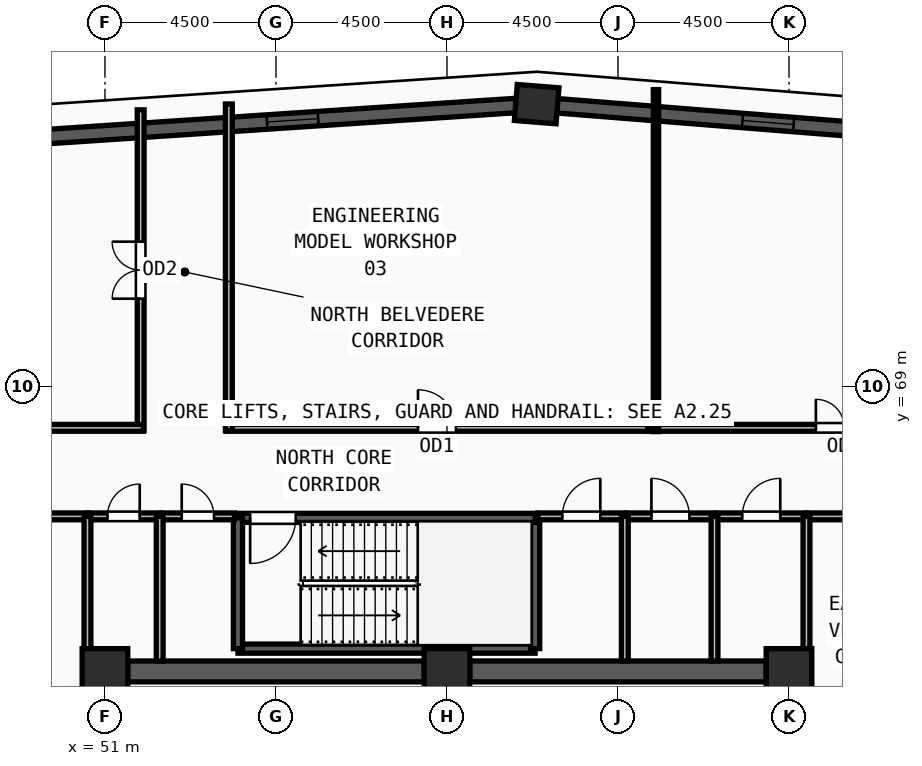
"""IFC4 building model, lengths in metres.
Left out: names, types, materials, properties, quantities, classifications, styles, units other than length and angle.
Written with IfcOpenShell. Run it as: python <this file> out.ifc"""

import sys

from ifc_helpers import new_model, si_unit, direction, frame, frame_2d, origin, origin_2d, place, context, subcontext, project, spatial, rectangle, extrude, source, transform, mapped, element, fill, save


model = new_model("IFC4")
c1 = context("Model", 3, precision=1e-05, world=origin(), true_north=direction((0.0, 1.0)))
c2 = subcontext(c1, "Body", "Model", "MODEL_VIEW")
j1 = project(units=[si_unit("LENGTHUNIT", "METRE"), si_unit("PLANEANGLEUNIT", "RADIAN")], contexts=[c1])
p1 = place(None, origin())
s1 = spatial("IfcSite", under=j1, at=p1, CompositionType="ELEMENT")
p2 = place(p1, origin())
s2 = spatial("IfcBuilding", under=s1, at=p2, CompositionType="ELEMENT")
p3 = place(p2, frame((0.0, 0.0, 286.5)))
s3 = spatial("IfcBuildingStorey", under=s2, at=p3, CompositionType="ELEMENT", Elevation=286.5)
m1 = source(origin(), c2, "Body", "SweptSolid", [
    extrude(rectangle(XDim=1.2, YDim=1.2, at=origin_2d()), origin(), (0.0, 0.0, 1.0), 3.75),
])
for number, where, z_axis, x_axis in (
    (1, (69.0, 61.5, 0.0), (0.0, 0.0, 1.0), (1.0, 0.0, 0.0)),
    (2, (60.0, 61.5, 0.0), (0.0, 0.0, 1.0), (1.0, 0.0, 0.0)),
    (3, (51.0, 61.5, 0.0), (0.0, 0.0, 1.0), (1.0, 0.0, 0.0)),
):
    element("IfcColumn", number, at=place(p3, frame(where, z_axis=z_axis, x_axis=x_axis)), inside=s3, PredefinedType="COLUMN", context=c2, shape_type="MappedRepresentation", body=[
        mapped(m1, transform((0.0, 0.0, 0.0), x_axis=(1.0, 0.0, 0.0), y_axis=(0.0, 1.0, 0.0), z_axis=(0.0, 0.0, 1.0), scale=1.0)),
    ])
m2 = source(origin(), c2, "Body", "SweptSolid", [
    extrude(rectangle(XDim=1.1, YDim=0.95, at=origin_2d()), origin(), (0.0, 0.0, 1.0), 3.75),
])
p4 = place(p3, frame((62.36, 76.427, 0.0), z_axis=(0.0, 0.0, 1.0), x_axis=(-0.996862316013, 0.079155056145, 0.0)))
e4 = element("IfcColumn", 4, at=p4, inside=s3, PredefinedType="COLUMN", context=c2, shape_type="MappedRepresentation", body=[
    mapped(m2, transform((0.0, 0.0, 0.0), x_axis=(1.0, 0.0, 0.0), y_axis=(0.0, 1.0, 0.0), z_axis=(0.0, 0.0, 1.0), scale=1.0)),
])
p5 = place(p3, frame((85.103, 74.621, 0.0), z_axis=(0.0, 0.0, 1.0), x_axis=(-0.996863155658, 0.079144481122, 0.0)))
e5 = element("IfcWall", 5, at=p5, inside=s3, PredefinedType="SOLIDWALL", context=c2, shape_type="SweptSolid", body=[
    extrude(rectangle(XDim=22.275, YDim=0.38, at=frame_2d((11.137, 0.0))), origin(), (0.0, 0.0, 1.0), 3.57),
])
m3 = source(origin(), c2, "Body", "SweptSolid", [
    extrude(rectangle(XDim=1.35, YDim=1.85, at=frame_2d((0.675, 0.925))), frame((0.0, 0.2, 0.0), z_axis=(0.0, -1.0, 0.0), x_axis=(1.0, 0.0, 0.0)), (0.0, 0.0, 1.0), 0.4),
])
p6 = place(p5, frame((4.894, 0.0, 0.55)))
e6 = element("IfcOpeningElement", 6, at=p6, cuts=e5, PredefinedType="OPENING", context=c2, shape_type="MappedRepresentation", body=[
    mapped(m3, transform((0.0, 0.0, 0.0), x_axis=(1.0, 0.0, 0.0), y_axis=(0.0, 1.0, 0.0), z_axis=(0.0, 0.0, 1.0), scale=1.0)),
])
p7 = place(p5, frame((10.462, 0.0, 0.55)))
e7 = element("IfcOpeningElement", 7, at=p7, cuts=e5, PredefinedType="OPENING", context=c2, shape_type="MappedRepresentation", body=[
    mapped(m3, transform((0.0, 0.0, 0.0), x_axis=(1.0, 0.0, 0.0), y_axis=(0.0, 1.0, 0.0), z_axis=(0.0, 0.0, 1.0), scale=1.0)),
])
p8 = place(p5, frame((16.031, 0.0, 0.55)))
e8 = element("IfcOpeningElement", 8, at=p8, cuts=e5, PredefinedType="OPENING", context=c2, shape_type="MappedRepresentation", body=[
    mapped(m3, transform((0.0, 0.0, 0.0), x_axis=(1.0, 0.0, 0.0), y_axis=(0.0, 1.0, 0.0), z_axis=(0.0, 0.0, 1.0), scale=1.0)),
])
p9 = place(p3, frame((61.821, 76.391, 0.0), z_axis=(0.0, 0.0, 1.0), x_axis=(-0.997809311933, -0.06615570285, 0.0)))
e9 = element("IfcWall", 9, at=p9, inside=s3, PredefinedType="SOLIDWALL", context=c2, shape_type="SweptSolid", body=[
    extrude(rectangle(XDim=26.984, YDim=0.38, at=frame_2d((13.492, 0.0))), origin(), (0.0, 0.0, 1.0), 3.57),
])
p10 = place(p9, frame((5.221, 0.0, 0.55)))
e10 = element("IfcOpeningElement", 10, at=p10, cuts=e9, PredefinedType="OPENING", context=c2, shape_type="MappedRepresentation", body=[
    mapped(m3, transform((0.0, 0.0, 0.0), x_axis=(1.0, 0.0, 0.0), y_axis=(0.0, 1.0, 0.0), z_axis=(0.0, 0.0, 1.0), scale=1.0)),
])
p11 = place(p9, frame((12.817, 0.0, 0.55)))
e11 = element("IfcOpeningElement", 11, at=p11, cuts=e9, PredefinedType="OPENING", context=c2, shape_type="MappedRepresentation", body=[
    mapped(m3, transform((0.0, 0.0, 0.0), x_axis=(1.0, 0.0, 0.0), y_axis=(0.0, 1.0, 0.0), z_axis=(0.0, 0.0, 1.0), scale=1.0)),
])
p12 = place(p9, frame((19.563, 0.0, 0.55)))
e12 = element("IfcOpeningElement", 12, at=p12, cuts=e9, PredefinedType="OPENING", context=c2, shape_type="MappedRepresentation", body=[
    mapped(m3, transform((0.0, 0.0, 0.0), x_axis=(1.0, 0.0, 0.0), y_axis=(0.0, 1.0, 0.0), z_axis=(0.0, 0.0, 1.0), scale=1.0)),
])
for number, where, z_axis, x_axis in (
    (13, (51.6, 61.5, 0.0), (0.0, 0.0, 1.0), (1.0, 0.0, 0.0)),
    (14, (60.6, 61.5, 0.0), (0.0, 0.0, 1.0), (1.0, 0.0, 0.0)),
):
    element("IfcWall", number, at=place(p3, frame(where, z_axis=z_axis, x_axis=x_axis)), inside=s3, PredefinedType="SHEAR", context=c2, shape_type="SweptSolid", body=[
        extrude(rectangle(XDim=7.8, YDim=0.55, at=frame_2d((3.9, 0.0))), origin(), (0.0, 0.0, 1.0), 3.57),
    ])
p13 = place(p3, frame((54.5, 62.1, 0.0), z_axis=(0.0, 0.0, 1.0), x_axis=(1.0, 0.0, 0.0)))
e15 = element("IfcWall", 15, at=p13, inside=s3, PredefinedType="SOLIDWALL", context=c2, shape_type="SweptSolid", body=[
    extrude(rectangle(XDim=7.82, YDim=0.24, at=frame_2d((3.91, 0.0))), origin(), (0.0, 0.0, 1.0), 3.57),
])
p14 = place(p3, frame((62.32, 62.1, 0.0), z_axis=(0.0, 0.0, 1.0), x_axis=(0.0, 1.0, 0.0)))
e16 = element("IfcWall", 16, at=p14, inside=s3, PredefinedType="SOLIDWALL", context=c2, shape_type="SweptSolid", body=[
    extrude(rectangle(XDim=3.44, YDim=0.24, at=frame_2d((1.72, 0.0))), origin(), (0.0, 0.0, 1.0), 3.57),
])
p15 = place(p3, frame((62.32, 65.54, 0.0), z_axis=(0.0, 0.0, 1.0), x_axis=(-1.0, 0.0, 0.0)))
e17 = element("IfcWall", 17, at=p15, inside=s3, PredefinedType="SOLIDWALL", context=c2, shape_type="SweptSolid", body=[
    extrude(rectangle(XDim=7.82, YDim=0.24, at=frame_2d((3.91, 0.0))), origin(), (0.0, 0.0, 1.0), 3.57),
])
m4 = source(origin(), c2, "Body", "SweptSolid", [
    extrude(rectangle(XDim=1.2, YDim=2.2, at=frame_2d((0.6, 1.1))), frame((0.0, 0.13, 0.0), z_axis=(0.0, -1.0, 0.0), x_axis=(1.0, 0.0, 0.0)), (0.0, 0.0, 1.0), 0.26),
])
p16 = place(p15, frame((6.3, 0.0, 0.0)))
e18 = element("IfcOpeningElement", 18, at=p16, cuts=e17, PredefinedType="OPENING", context=c2, shape_type="MappedRepresentation", body=[
    mapped(m4, transform((0.0, 0.0, 0.0), x_axis=(1.0, 0.0, 0.0), y_axis=(0.0, 1.0, 0.0), z_axis=(0.0, 0.0, 1.0), scale=1.0)),
])
p17 = place(p3, frame((54.5, 65.54, 0.0), z_axis=(0.0, 0.0, 1.0), x_axis=(0.0, -1.0, 0.0)))
e19 = element("IfcWall", 19, at=p17, inside=s3, PredefinedType="SOLIDWALL", context=c2, shape_type="SweptSolid", body=[
    extrude(rectangle(XDim=3.44, YDim=0.24, at=frame_2d((1.72, 0.0))), origin(), (0.0, 0.0, 1.0), 3.57),
])
p18 = place(p3, frame((50.54, 65.58, 0.0), z_axis=(0.0, 0.0, 1.0), x_axis=(1.0, 0.0, 0.0)))
e20 = element("IfcWall", 20, at=p18, inside=s3, PredefinedType="PARTITIONING", context=c2, shape_type="SweptSolid", body=[
    extrude(rectangle(XDim=1.9, YDim=0.18, at=frame_2d((0.95, 0.0))), origin(), (0.0, 0.0, 1.0), 3.57),
])
m5 = source(origin(), c2, "Body", "SweptSolid", [
    extrude(rectangle(XDim=0.85, YDim=2.1, at=frame_2d((0.425, 1.05))), frame((0.0, 0.1, 0.0), z_axis=(0.0, -1.0, 0.0), x_axis=(1.0, 0.0, 0.0)), (0.0, 0.0, 1.0), 0.2),
])
p19 = place(p18, frame((0.525, 0.0, 0.0)))
e21 = element("IfcOpeningElement", 21, at=p19, cuts=e20, PredefinedType="OPENING", context=c2, shape_type="MappedRepresentation", body=[
    mapped(m5, transform((0.0, 0.0, 0.0), x_axis=(1.0, 0.0, 0.0), y_axis=(0.0, 1.0, 0.0), z_axis=(0.0, 0.0, 1.0), scale=1.0)),
])
p20 = place(p3, frame((52.48, 65.58, 0.0), z_axis=(0.0, 0.0, 1.0), x_axis=(1.0, 0.0, 0.0)))
e22 = element("IfcWall", 22, at=p20, inside=s3, PredefinedType="PARTITIONING", context=c2, shape_type="SweptSolid", body=[
    extrude(rectangle(XDim=1.93, YDim=0.18, at=frame_2d((0.965, 0.0))), origin(), (0.0, 0.0, 1.0), 3.57),
])
p21 = place(p20, frame((0.54, 0.0, 0.0)))
e23 = element("IfcOpeningElement", 23, at=p21, cuts=e22, PredefinedType="OPENING", context=c2, shape_type="MappedRepresentation", body=[
    mapped(m5, transform((0.0, 0.0, 0.0), x_axis=(1.0, 0.0, 0.0), y_axis=(0.0, 1.0, 0.0), z_axis=(0.0, 0.0, 1.0), scale=1.0)),
])
p22 = place(p3, frame((62.39, 65.58, 0.0), z_axis=(0.0, 0.0, 1.0), x_axis=(1.0, 0.0, 0.0)))
e24 = element("IfcWall", 24, at=p22, inside=s3, PredefinedType="PARTITIONING", context=c2, shape_type="SweptSolid", body=[
    extrude(rectangle(XDim=2.29, YDim=0.18, at=frame_2d((1.145, 0.0))), origin(), (0.0, 0.0, 1.0), 3.57),
])
m6 = source(origin(), c2, "Body", "SweptSolid", [
    extrude(rectangle(XDim=1.0, YDim=2.2, at=frame_2d((0.5, 1.1))), frame((0.0, 0.1, 0.0), z_axis=(0.0, -1.0, 0.0), x_axis=(1.0, 0.0, 0.0)), (0.0, 0.0, 1.0), 0.2),
])
p23 = place(p22, frame((0.645, 0.0, 0.0)))
e25 = element("IfcOpeningElement", 25, at=p23, cuts=e24, PredefinedType="OPENING", context=c2, shape_type="MappedRepresentation", body=[
    mapped(m6, transform((0.0, 0.0, 0.0), x_axis=(1.0, 0.0, 0.0), y_axis=(0.0, 1.0, 0.0), z_axis=(0.0, 0.0, 1.0), scale=1.0)),
])
p24 = place(p3, frame((64.72, 65.58, 0.0), z_axis=(0.0, 0.0, 1.0), x_axis=(1.0, 0.0, 0.0)))
e26 = element("IfcWall", 26, at=p24, inside=s3, PredefinedType="PARTITIONING", context=c2, shape_type="SweptSolid", body=[
    extrude(rectangle(XDim=2.32, YDim=0.18, at=frame_2d((1.16, 0.0))), origin(), (0.0, 0.0, 1.0), 3.57),
])
p25 = place(p24, frame((0.66, 0.0, 0.0)))
e27 = element("IfcOpeningElement", 27, at=p25, cuts=e26, PredefinedType="OPENING", context=c2, shape_type="MappedRepresentation", body=[
    mapped(m6, transform((0.0, 0.0, 0.0), x_axis=(1.0, 0.0, 0.0), y_axis=(0.0, 1.0, 0.0), z_axis=(0.0, 0.0, 1.0), scale=1.0)),
])
p26 = place(p3, frame((67.08, 65.58, 0.0), z_axis=(0.0, 0.0, 1.0), x_axis=(1.0, 0.0, 0.0)))
e28 = element("IfcWall", 28, at=p26, inside=s3, PredefinedType="PARTITIONING", context=c2, shape_type="SweptSolid", body=[
    extrude(rectangle(XDim=2.38, YDim=0.18, at=frame_2d((1.19, 0.0))), origin(), (0.0, 0.0, 1.0), 3.57),
])
p27 = place(p26, frame((0.69, 0.0, 0.0)))
e29 = element("IfcOpeningElement", 29, at=p27, cuts=e28, PredefinedType="OPENING", context=c2, shape_type="MappedRepresentation", body=[
    mapped(m6, transform((0.0, 0.0, 0.0), x_axis=(1.0, 0.0, 0.0), y_axis=(0.0, 1.0, 0.0), z_axis=(0.0, 0.0, 1.0), scale=1.0)),
])
p28 = place(p3, frame((46.7, 65.58, 0.0), z_axis=(0.0, 0.0, 1.0), x_axis=(1.0, 0.0, 0.0)))
e30 = element("IfcWall", 30, at=p28, inside=s3, PredefinedType="PARTITIONING", context=c2, shape_type="SweptSolid", body=[
    extrude(rectangle(XDim=3.84, YDim=0.18, at=frame_2d((1.92, 0.0))), origin(), (0.0, 0.0, 1.0), 3.57),
])
m7 = source(origin(), c2, "Body", "SweptSolid", [
    extrude(rectangle(XDim=1.3, YDim=2.2, at=frame_2d((0.65, 1.1))), frame((0.0, 0.1, 0.0), z_axis=(0.0, -1.0, 0.0), x_axis=(1.0, 0.0, 0.0)), (0.0, 0.0, 1.0), 0.2),
])
p29 = place(p28, frame((1.27, 0.0, 0.0)))
e31 = element("IfcOpeningElement", 31, at=p29, cuts=e30, PredefinedType="OPENING", context=c2, shape_type="MappedRepresentation", body=[
    mapped(m7, transform((0.0, 0.0, 0.0), x_axis=(1.0, 0.0, 0.0), y_axis=(0.0, 1.0, 0.0), z_axis=(0.0, 0.0, 1.0), scale=1.0)),
])
p30 = place(p3, frame((69.46, 65.58, 0.0), z_axis=(0.0, 0.0, 1.0), x_axis=(1.0, 0.0, 0.0)))
e32 = element("IfcWall", 32, at=p30, inside=s3, PredefinedType="PARTITIONING", context=c2, shape_type="SweptSolid", body=[
    extrude(rectangle(XDim=3.84, YDim=0.18, at=frame_2d((1.92, 0.0))), origin(), (0.0, 0.0, 1.0), 3.57),
])
p31 = place(p30, frame((1.27, 0.0, 0.0)))
e33 = element("IfcOpeningElement", 33, at=p31, cuts=e32, PredefinedType="OPENING", context=c2, shape_type="MappedRepresentation", body=[
    mapped(m7, transform((0.0, 0.0, 0.0), x_axis=(1.0, 0.0, 0.0), y_axis=(0.0, 1.0, 0.0), z_axis=(0.0, 0.0, 1.0), scale=1.0)),
])
p32 = place(p3, frame((65.285, 67.91, 0.0), z_axis=(0.0, 0.0, 1.0), x_axis=(1.0, 0.0, 0.0)))
e34 = element("IfcWall", 34, at=p32, inside=s3, PredefinedType="PARTITIONING", context=c2, shape_type="SweptSolid", body=[
    extrude(rectangle(XDim=10.345, YDim=0.18, at=frame_2d((5.172, 0.0))), origin(), (0.0, 0.0, 1.0), 3.261),
])
m8 = source(origin(), c2, "Body", "SweptSolid", [
    extrude(rectangle(XDim=1.5, YDim=2.2, at=frame_2d((0.75, 1.1))), frame((0.0, 0.1, 0.0), z_axis=(0.0, -1.0, 0.0), x_axis=(1.0, 0.0, 0.0)), (0.0, 0.0, 1.0), 0.2),
])
p33 = place(p32, frame((4.422, 0.0, 0.0)))
e35 = element("IfcOpeningElement", 35, at=p33, cuts=e34, PredefinedType="OPENING", context=c2, shape_type="MappedRepresentation", body=[
    mapped(m8, transform((0.0, 0.0, 0.0), x_axis=(1.0, 0.0, 0.0), y_axis=(0.0, 1.0, 0.0), z_axis=(0.0, 0.0, 1.0), scale=1.0)),
])
p34 = place(p3, frame((54.19, 67.91, 0.0), z_axis=(0.0, 0.0, 1.0), x_axis=(1.0, 0.0, 0.0)))
e36 = element("IfcWall", 36, at=p34, inside=s3, PredefinedType="PARTITIONING", context=c2, shape_type="SweptSolid", body=[
    extrude(rectangle(XDim=11.095, YDim=0.18, at=frame_2d((5.547, 0.0))), origin(), (0.0, 0.0, 1.0), 3.261),
])
p35 = place(p34, frame((5.047, 0.0, 0.0)))
e37 = element("IfcOpeningElement", 37, at=p35, cuts=e36, PredefinedType="OPENING", context=c2, shape_type="MappedRepresentation", body=[
    mapped(m6, transform((0.0, 0.0, 0.0), x_axis=(1.0, 0.0, 0.0), y_axis=(0.0, 1.0, 0.0), z_axis=(0.0, 0.0, 1.0), scale=1.0)),
])
p36 = place(p3, frame((51.94, 67.84, 0.0), z_axis=(0.0, 0.0, 1.0), x_axis=(0.0, 1.0, 0.0)))
e38 = element("IfcWall", 38, at=p36, inside=s3, PredefinedType="PARTITIONING", context=c2, shape_type="SweptSolid", body=[
    extrude(rectangle(XDim=8.437, YDim=0.18, at=frame_2d((4.219, 0.0))), origin(), (0.0, 0.0, 1.0), 3.57),
])
p37 = place(p36, frame((3.468, 0.0, 0.0)))
e39 = element("IfcOpeningElement", 39, at=p37, cuts=e38, PredefinedType="OPENING", context=c2, shape_type="MappedRepresentation", body=[
    mapped(m8, transform((0.0, 0.0, 0.0), x_axis=(1.0, 0.0, 0.0), y_axis=(0.0, 1.0, 0.0), z_axis=(0.0, 0.0, 1.0), scale=1.0)),
])
p38 = place(p3, frame((50.54, 61.95, 0.0), z_axis=(0.0, 0.0, 1.0), x_axis=(0.0, 1.0, 0.0)))
e40 = element("IfcWall", 40, at=p38, inside=s3, PredefinedType="PARTITIONING", context=c2, shape_type="SweptSolid", body=[
    extrude(rectangle(XDim=3.63, YDim=0.18, at=frame_2d((1.815, 0.0))), origin(), (0.0, 0.0, 1.0), 3.57),
])
for number, where, z_axis, x_axis in (
    (41, (52.44, 61.775, 0.0), (0.0, 0.0, 1.0), (0.0, 1.0, 0.0)),
    (42, (64.68, 61.775, 0.0), (0.0, 0.0, 1.0), (0.0, 1.0, 0.0)),
    (43, (67.04, 61.775, 0.0), (0.0, 0.0, 1.0), (0.0, 1.0, 0.0)),
):
    element("IfcWall", number, at=place(p3, frame(where, z_axis=z_axis, x_axis=x_axis)), inside=s3, PredefinedType="PARTITIONING", context=c2, shape_type="SweptSolid", body=[
        extrude(rectangle(XDim=3.805, YDim=0.18, at=frame_2d((1.903, 0.0))), origin(), (0.0, 0.0, 1.0), 3.57),
    ])
p39 = place(p3, frame((69.46, 61.95, 0.0), z_axis=(0.0, 0.0, 1.0), x_axis=(0.0, 1.0, 0.0)))
e44 = element("IfcWall", 44, at=p39, inside=s3, PredefinedType="PARTITIONING", context=c2, shape_type="SweptSolid", body=[
    extrude(rectangle(XDim=3.63, YDim=0.18, at=frame_2d((1.815, 0.0))), origin(), (0.0, 0.0, 1.0), 3.57),
])
p40 = place(p3, frame((54.26, 76.431, 0.0), z_axis=(0.0, 0.0, 1.0), x_axis=(0.0, -1.0, 0.0)))
e45 = element("IfcWall", 45, at=p40, inside=s3, PredefinedType="PARTITIONING", context=c2, shape_type="SweptSolid", body=[
    extrude(rectangle(XDim=8.591, YDim=0.18, at=frame_2d((4.295, 0.0))), origin(), (0.0, 0.0, 1.0), 3.57),
])
p41 = place(p3, frame((44.37, 67.91, 0.0), z_axis=(0.0, 0.0, 1.0), x_axis=(1.0, 0.0, 0.0)))
e46 = element("IfcWall", 46, at=p41, inside=s3, PredefinedType="PARTITIONING", context=c2, shape_type="SweptSolid", body=[
    extrude(rectangle(XDim=7.64, YDim=0.18, at=frame_2d((3.82, 0.0))), origin(), (0.0, 0.0, 1.0), 3.57),
])
p42 = place(p3, frame((65.5, 67.81, 0.0), z_axis=(0.0, 0.0, 1.0), x_axis=(0.0, 1.0, 0.0)))
e47 = element("IfcWall", 47, at=p42, inside=s3, PredefinedType="PARTITIONING", context=c2, shape_type="SweptSolid", body=[
    extrude(rectangle(XDim=8.999, YDim=0.14, at=frame_2d((4.5, 0.0))), origin(), (0.0, 0.0, 1.0), 3.57),
])
m9 = source(origin(), c2, "Body", "SweptSolid", [
    extrude(rectangle(XDim=1.35, YDim=1.85, at=frame_2d((0.675, 0.925))), frame((0.0, 0.03, 0.0), z_axis=(0.0, -1.0, 0.0), x_axis=(1.0, 0.0, 0.0)), (0.0, 0.0, 1.0), 0.06),
])
p43 = place(p8, origin())
e48 = element("IfcWindow", 48, at=p43, inside=s3, PartitioningType="SINGLE_PANEL", PredefinedType="WINDOW", context=c2, shape_type="MappedRepresentation", body=[
    mapped(m9, transform((0.0, 0.0, 0.0), x_axis=(1.0, 0.0, 0.0), y_axis=(0.0, 1.0, 0.0), z_axis=(0.0, 0.0, 1.0), scale=1.0)),
])
fill(e8, e48)
p44 = place(p10, origin())
e49 = element("IfcWindow", 49, at=p44, inside=s3, PartitioningType="SINGLE_PANEL", PredefinedType="WINDOW", context=c2, shape_type="MappedRepresentation", body=[
    mapped(m9, transform((0.0, 0.0, 0.0), x_axis=(1.0, 0.0, 0.0), y_axis=(0.0, 1.0, 0.0), z_axis=(0.0, 0.0, 1.0), scale=1.0)),
])
fill(e10, e49)
m10 = source(origin(), c2, "Body", "SweptSolid", [
    extrude(rectangle(XDim=1.2, YDim=2.2, at=frame_2d((0.6, 1.1))), frame((0.0, 0.025, 0.0), z_axis=(0.0, -1.0, 0.0), x_axis=(1.0, 0.0, 0.0)), (0.0, 0.0, 1.0), 0.05),
])
p45 = place(p16, origin())
e50 = element("IfcDoor", 50, at=p45, inside=s3, OperationType="SINGLE_SWING_RIGHT", PredefinedType="DOOR", context=c2, shape_type="MappedRepresentation", body=[
    mapped(m10, transform((0.0, 0.0, 0.0), x_axis=(1.0, 0.0, 0.0), y_axis=(0.0, 1.0, 0.0), z_axis=(0.0, 0.0, 1.0), scale=1.0)),
])
fill(e18, e50)
m11 = source(origin(), c2, "Body", "SweptSolid", [
    extrude(rectangle(XDim=0.85, YDim=2.1, at=frame_2d((0.425, 1.05))), frame((0.0, 0.025, 0.0), z_axis=(0.0, -1.0, 0.0), x_axis=(1.0, 0.0, 0.0)), (0.0, 0.0, 1.0), 0.05),
])
p46 = place(p19, origin())
e51 = element("IfcDoor", 51, at=p46, inside=s3, OperationType="SINGLE_SWING_RIGHT", PredefinedType="DOOR", context=c2, shape_type="MappedRepresentation", body=[
    mapped(m11, transform((0.0, 0.0, 0.0), x_axis=(1.0, 0.0, 0.0), y_axis=(0.0, 1.0, 0.0), z_axis=(0.0, 0.0, 1.0), scale=1.0)),
])
fill(e21, e51)
p47 = place(p21, origin())
e52 = element("IfcDoor", 52, at=p47, inside=s3, OperationType="SINGLE_SWING_LEFT", PredefinedType="DOOR", context=c2, shape_type="MappedRepresentation", body=[
    mapped(m11, transform((0.0, 0.0, 0.0), x_axis=(1.0, 0.0, 0.0), y_axis=(0.0, 1.0, 0.0), z_axis=(0.0, 0.0, 1.0), scale=1.0)),
])
fill(e23, e52)
m12 = source(origin(), c2, "Body", "SweptSolid", [
    extrude(rectangle(XDim=1.0, YDim=2.2, at=frame_2d((0.5, 1.1))), frame((0.0, 0.025, 0.0), z_axis=(0.0, -1.0, 0.0), x_axis=(1.0, 0.0, 0.0)), (0.0, 0.0, 1.0), 0.05),
])
p48 = place(p23, origin())
e53 = element("IfcDoor", 53, at=p48, inside=s3, OperationType="SINGLE_SWING_RIGHT", PredefinedType="DOOR", context=c2, shape_type="MappedRepresentation", body=[
    mapped(m12, transform((0.0, 0.0, 0.0), x_axis=(1.0, 0.0, 0.0), y_axis=(0.0, 1.0, 0.0), z_axis=(0.0, 0.0, 1.0), scale=1.0)),
])
fill(e25, e53)
p49 = place(p25, origin())
e54 = element("IfcDoor", 54, at=p49, inside=s3, OperationType="SINGLE_SWING_LEFT", PredefinedType="DOOR", context=c2, shape_type="MappedRepresentation", body=[
    mapped(m12, transform((0.0, 0.0, 0.0), x_axis=(1.0, 0.0, 0.0), y_axis=(0.0, 1.0, 0.0), z_axis=(0.0, 0.0, 1.0), scale=1.0)),
])
fill(e27, e54)
p50 = place(p27, origin())
e55 = element("IfcDoor", 55, at=p50, inside=s3, OperationType="SINGLE_SWING_RIGHT", PredefinedType="DOOR", context=c2, shape_type="MappedRepresentation", body=[
    mapped(m12, transform((0.0, 0.0, 0.0), x_axis=(1.0, 0.0, 0.0), y_axis=(0.0, 1.0, 0.0), z_axis=(0.0, 0.0, 1.0), scale=1.0)),
])
fill(e29, e55)
m13 = source(origin(), c2, "Body", "SweptSolid", [
    extrude(rectangle(XDim=1.5, YDim=2.2, at=frame_2d((0.75, 1.1))), frame((0.0, 0.025, 0.0), z_axis=(0.0, -1.0, 0.0), x_axis=(1.0, 0.0, 0.0)), (0.0, 0.0, 1.0), 0.05),
])
p51 = place(p33, origin())
e56 = element("IfcDoor", 56, at=p51, inside=s3, OperationType="DOUBLE_DOOR_SINGLE_SWING", PredefinedType="DOOR", context=c2, shape_type="MappedRepresentation", body=[
    mapped(m13, transform((0.0, 0.0, 0.0), x_axis=(1.0, 0.0, 0.0), y_axis=(0.0, 1.0, 0.0), z_axis=(0.0, 0.0, 1.0), scale=1.0)),
])
fill(e35, e56)
p52 = place(p35, origin())
e57 = element("IfcDoor", 57, at=p52, inside=s3, OperationType="SINGLE_SWING_LEFT", PredefinedType="DOOR", context=c2, shape_type="MappedRepresentation", body=[
    mapped(m12, transform((0.0, 0.0, 0.0), x_axis=(1.0, 0.0, 0.0), y_axis=(0.0, 1.0, 0.0), z_axis=(0.0, 0.0, 1.0), scale=1.0)),
])
fill(e37, e57)
p53 = place(p37, origin())
e58 = element("IfcDoor", 58, at=p53, inside=s3, OperationType="DOUBLE_DOOR_SINGLE_SWING", PredefinedType="DOOR", context=c2, shape_type="MappedRepresentation", body=[
    mapped(m13, transform((0.0, 0.0, 0.0), x_axis=(1.0, 0.0, 0.0), y_axis=(0.0, 1.0, 0.0), z_axis=(0.0, 0.0, 1.0), scale=1.0)),
])
fill(e39, e58)
save(model, sys.argv[1])
